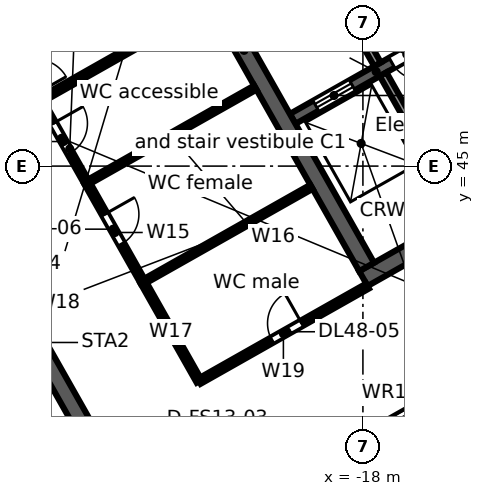
"""IFC4 building model, lengths in metres.
Left out: names, types, materials, properties, quantities, classifications, styles, units other than length and angle.
Written with IfcOpenShell. Run it as: python <this file> out.ifc"""

import sys

from ifc_helpers import new_model, si_unit, direction, frame, frame_2d, origin, place, context, subcontext, project, spatial, rectangle, extrude, element, fill, save


model = new_model("IFC4")
c1 = context("Model", 3, precision=1e-05, world=origin(), true_north=direction((0.0, 1.0)))
c2 = subcontext(c1, "Body", "Model", "MODEL_VIEW")
j1 = project(units=[si_unit("LENGTHUNIT", "METRE"), si_unit("PLANEANGLEUNIT", "RADIAN")], contexts=[c1])
p1 = place(None, origin())
s1 = spatial("IfcSite", under=j1, at=p1, CompositionType="ELEMENT")
p2 = place(p1, origin())
s2 = spatial("IfcBuilding", under=s1, at=p2, CompositionType="ELEMENT")
p3 = place(p2, frame((0.0, 0.0, 219.2)))
s3 = spatial("IfcBuildingStorey", under=s2, at=p3, CompositionType="ELEMENT", Elevation=219.2)
p4 = place(p3, frame((-0.046, 47.974, 0.0), z_axis=(0.0, 0.0, 1.0), x_axis=(-0.870356579543, -0.492421998337, 0.0)))
e1 = element("IfcWall", 1, at=p4, inside=s3, PredefinedType="STANDARD", context=c2, shape_type="SweptSolid", body=[
    extrude(rectangle(XDim=43.754, YDim=0.25, at=frame_2d((21.877, 0.0))), origin(), (0.0, 0.0, 1.0), 3.62),
])
p5 = place(p4, frame((41.061, 0.0, 0.8)))
e2 = element("IfcOpeningElement", 2, at=p5, cuts=e1, PredefinedType="OPENING", context=c2, shape_type="SweptSolid", body=[
    extrude(rectangle(XDim=2.4, YDim=2.2, at=frame_2d((1.2, 1.1))), frame((0.0, 0.135, 0.0), z_axis=(0.0, -1.0, 0.0), x_axis=(1.0, 0.0, 0.0)), (0.0, 0.0, 1.0), 0.27),
])
p6 = place(p4, frame((38.443, 0.0, 0.0)))
e3 = element("IfcOpeningElement", 3, at=p6, cuts=e1, PredefinedType="OPENING", context=c2, shape_type="SweptSolid", body=[
    extrude(rectangle(XDim=1.8, YDim=2.4, at=frame_2d((0.9, 1.2))), frame((0.0, 0.135, 0.0), z_axis=(0.0, -1.0, 0.0), x_axis=(1.0, 0.0, 0.0)), (0.0, 0.0, 1.0), 0.27),
])
p7 = place(p4, frame((35.225, 0.0, 0.8)))
e4 = element("IfcOpeningElement", 4, at=p7, cuts=e1, PredefinedType="OPENING", context=c2, shape_type="SweptSolid", body=[
    extrude(rectangle(XDim=2.4, YDim=2.2, at=frame_2d((1.2, 1.1))), frame((0.0, 0.135, 0.0), z_axis=(0.0, -1.0, 0.0), x_axis=(1.0, 0.0, 0.0)), (0.0, 0.0, 1.0), 0.27),
])
p8 = place(p4, frame((32.307, 0.0, 0.8)))
e5 = element("IfcOpeningElement", 5, at=p8, cuts=e1, PredefinedType="OPENING", context=c2, shape_type="SweptSolid", body=[
    extrude(rectangle(XDim=2.4, YDim=2.2, at=frame_2d((1.2, 1.1))), frame((0.0, 0.135, 0.0), z_axis=(0.0, -1.0, 0.0), x_axis=(1.0, 0.0, 0.0)), (0.0, 0.0, 1.0), 0.27),
])
p9 = place(p4, frame((29.688, 0.0, 0.0)))
e6 = element("IfcOpeningElement", 6, at=p9, cuts=e1, PredefinedType="OPENING", context=c2, shape_type="SweptSolid", body=[
    extrude(rectangle(XDim=1.8, YDim=2.4, at=frame_2d((0.9, 1.2))), frame((0.0, 0.135, 0.0), z_axis=(0.0, -1.0, 0.0), x_axis=(1.0, 0.0, 0.0)), (0.0, 0.0, 1.0), 0.27),
])
p10 = place(p4, frame((26.47, 0.0, 0.8)))
e7 = element("IfcOpeningElement", 7, at=p10, cuts=e1, PredefinedType="OPENING", context=c2, shape_type="SweptSolid", body=[
    extrude(rectangle(XDim=2.4, YDim=2.2, at=frame_2d((1.2, 1.1))), frame((0.0, 0.135, 0.0), z_axis=(0.0, -1.0, 0.0), x_axis=(1.0, 0.0, 0.0)), (0.0, 0.0, 1.0), 0.27),
])
p11 = place(p4, frame((23.552, 0.0, 0.8)))
e8 = element("IfcOpeningElement", 8, at=p11, cuts=e1, PredefinedType="OPENING", context=c2, shape_type="SweptSolid", body=[
    extrude(rectangle(XDim=2.4, YDim=2.2, at=frame_2d((1.2, 1.1))), frame((0.0, 0.135, 0.0), z_axis=(0.0, -1.0, 0.0), x_axis=(1.0, 0.0, 0.0)), (0.0, 0.0, 1.0), 0.27),
])
p12 = place(p4, frame((20.934, 0.0, 0.0)))
e9 = element("IfcOpeningElement", 9, at=p12, cuts=e1, PredefinedType="OPENING", context=c2, shape_type="SweptSolid", body=[
    extrude(rectangle(XDim=1.8, YDim=2.4, at=frame_2d((0.9, 1.2))), frame((0.0, 0.135, 0.0), z_axis=(0.0, -1.0, 0.0), x_axis=(1.0, 0.0, 0.0)), (0.0, 0.0, 1.0), 0.27),
])
p13 = place(p4, frame((17.716, 0.0, 0.8)))
e10 = element("IfcOpeningElement", 10, at=p13, cuts=e1, PredefinedType="OPENING", context=c2, shape_type="SweptSolid", body=[
    extrude(rectangle(XDim=2.4, YDim=2.2, at=frame_2d((1.2, 1.1))), frame((0.0, 0.135, 0.0), z_axis=(0.0, -1.0, 0.0), x_axis=(1.0, 0.0, 0.0)), (0.0, 0.0, 1.0), 0.27),
])
p14 = place(p4, frame((14.798, 0.0, 0.8)))
e11 = element("IfcOpeningElement", 11, at=p14, cuts=e1, PredefinedType="OPENING", context=c2, shape_type="SweptSolid", body=[
    extrude(rectangle(XDim=2.4, YDim=2.2, at=frame_2d((1.2, 1.1))), frame((0.0, 0.135, 0.0), z_axis=(0.0, -1.0, 0.0), x_axis=(1.0, 0.0, 0.0)), (0.0, 0.0, 1.0), 0.27),
])
p15 = place(p4, frame((12.179, 0.0, 0.0)))
e12 = element("IfcOpeningElement", 12, at=p15, cuts=e1, PredefinedType="OPENING", context=c2, shape_type="SweptSolid", body=[
    extrude(rectangle(XDim=1.8, YDim=2.4, at=frame_2d((0.9, 1.2))), frame((0.0, 0.135, 0.0), z_axis=(0.0, -1.0, 0.0), x_axis=(1.0, 0.0, 0.0)), (0.0, 0.0, 1.0), 0.27),
])
p16 = place(p4, frame((8.961, 0.0, 0.8)))
e13 = element("IfcOpeningElement", 13, at=p16, cuts=e1, PredefinedType="OPENING", context=c2, shape_type="SweptSolid", body=[
    extrude(rectangle(XDim=2.4, YDim=2.2, at=frame_2d((1.2, 1.1))), frame((0.0, 0.135, 0.0), z_axis=(0.0, -1.0, 0.0), x_axis=(1.0, 0.0, 0.0)), (0.0, 0.0, 1.0), 0.27),
])
p17 = place(p4, frame((6.043, 0.0, 0.8)))
e14 = element("IfcOpeningElement", 14, at=p17, cuts=e1, PredefinedType="OPENING", context=c2, shape_type="SweptSolid", body=[
    extrude(rectangle(XDim=2.4, YDim=2.2, at=frame_2d((1.2, 1.1))), frame((0.0, 0.135, 0.0), z_axis=(0.0, -1.0, 0.0), x_axis=(1.0, 0.0, 0.0)), (0.0, 0.0, 1.0), 0.27),
])
p18 = place(p4, frame((3.425, 0.0, 0.0)))
e15 = element("IfcOpeningElement", 15, at=p18, cuts=e1, PredefinedType="OPENING", context=c2, shape_type="SweptSolid", body=[
    extrude(rectangle(XDim=1.8, YDim=2.4, at=frame_2d((0.9, 1.2))), frame((0.0, 0.135, 0.0), z_axis=(0.0, -1.0, 0.0), x_axis=(1.0, 0.0, 0.0)), (0.0, 0.0, 1.0), 0.27),
])
p19 = place(p4, frame((0.207, 0.0, 0.8)))
e16 = element("IfcOpeningElement", 16, at=p19, cuts=e1, PredefinedType="OPENING", context=c2, shape_type="SweptSolid", body=[
    extrude(rectangle(XDim=2.4, YDim=2.2, at=frame_2d((1.2, 1.1))), frame((0.0, 0.135, 0.0), z_axis=(0.0, -1.0, 0.0), x_axis=(1.0, 0.0, 0.0)), (0.0, 0.0, 1.0), 0.27),
])
p20 = place(p3, frame((-58.732, 38.771, 0.0), z_axis=(0.0, 0.0, 1.0), x_axis=(0.870354824205, 0.492425100887, 0.0)))
e17 = element("IfcWall", 17, at=p20, inside=s3, PredefinedType="STANDARD", context=c2, shape_type="SweptSolid", body=[
    extrude(rectangle(XDim=64.006, YDim=0.25, at=frame_2d((32.003, 0.0))), origin(), (0.0, 0.0, 1.0), 3.62),
])
p21 = place(p20, frame((61.259, 0.0, 0.8)))
e18 = element("IfcOpeningElement", 18, at=p21, cuts=e17, PredefinedType="OPENING", context=c2, shape_type="SweptSolid", body=[
    extrude(rectangle(XDim=2.4, YDim=2.2, at=frame_2d((1.2, 1.1))), frame((0.0, 0.135, 0.0), z_axis=(0.0, -1.0, 0.0), x_axis=(1.0, 0.0, 0.0)), (0.0, 0.0, 1.0), 0.27),
])
p22 = place(p20, frame((58.216, 0.0, 0.8)))
e19 = element("IfcOpeningElement", 19, at=p22, cuts=e17, PredefinedType="OPENING", context=c2, shape_type="SweptSolid", body=[
    extrude(rectangle(XDim=2.4, YDim=2.2, at=frame_2d((1.2, 1.1))), frame((0.0, 0.135, 0.0), z_axis=(0.0, -1.0, 0.0), x_axis=(1.0, 0.0, 0.0)), (0.0, 0.0, 1.0), 0.27),
])
p23 = place(p20, frame((55.173, 0.0, 0.8)))
e20 = element("IfcOpeningElement", 20, at=p23, cuts=e17, PredefinedType="OPENING", context=c2, shape_type="SweptSolid", body=[
    extrude(rectangle(XDim=2.4, YDim=2.2, at=frame_2d((1.2, 1.1))), frame((0.0, 0.135, 0.0), z_axis=(0.0, -1.0, 0.0), x_axis=(1.0, 0.0, 0.0)), (0.0, 0.0, 1.0), 0.27),
])
p24 = place(p20, frame((52.129, 0.0, 0.8)))
e21 = element("IfcOpeningElement", 21, at=p24, cuts=e17, PredefinedType="OPENING", context=c2, shape_type="SweptSolid", body=[
    extrude(rectangle(XDim=2.4, YDim=2.2, at=frame_2d((1.2, 1.1))), frame((0.0, 0.135, 0.0), z_axis=(0.0, -1.0, 0.0), x_axis=(1.0, 0.0, 0.0)), (0.0, 0.0, 1.0), 0.27),
])
p25 = place(p20, frame((49.086, 0.0, 0.8)))
e22 = element("IfcOpeningElement", 22, at=p25, cuts=e17, PredefinedType="OPENING", context=c2, shape_type="SweptSolid", body=[
    extrude(rectangle(XDim=2.4, YDim=2.2, at=frame_2d((1.2, 1.1))), frame((0.0, 0.135, 0.0), z_axis=(0.0, -1.0, 0.0), x_axis=(1.0, 0.0, 0.0)), (0.0, 0.0, 1.0), 0.27),
])
p26 = place(p20, frame((46.043, 0.0, 0.8)))
e23 = element("IfcOpeningElement", 23, at=p26, cuts=e17, PredefinedType="OPENING", context=c2, shape_type="SweptSolid", body=[
    extrude(rectangle(XDim=2.4, YDim=2.2, at=frame_2d((1.2, 1.1))), frame((0.0, 0.135, 0.0), z_axis=(0.0, -1.0, 0.0), x_axis=(1.0, 0.0, 0.0)), (0.0, 0.0, 1.0), 0.27),
])
p27 = place(p20, frame((43.0, 0.0, 0.8)))
e24 = element("IfcOpeningElement", 24, at=p27, cuts=e17, PredefinedType="OPENING", context=c2, shape_type="SweptSolid", body=[
    extrude(rectangle(XDim=2.4, YDim=2.2, at=frame_2d((1.2, 1.1))), frame((0.0, 0.135, 0.0), z_axis=(0.0, -1.0, 0.0), x_axis=(1.0, 0.0, 0.0)), (0.0, 0.0, 1.0), 0.27),
])
p28 = place(p20, frame((39.956, 0.0, 0.8)))
e25 = element("IfcOpeningElement", 25, at=p28, cuts=e17, PredefinedType="OPENING", context=c2, shape_type="SweptSolid", body=[
    extrude(rectangle(XDim=2.4, YDim=2.2, at=frame_2d((1.2, 1.1))), frame((0.0, 0.135, 0.0), z_axis=(0.0, -1.0, 0.0), x_axis=(1.0, 0.0, 0.0)), (0.0, 0.0, 1.0), 0.27),
])
p29 = place(p20, frame((36.913, 0.0, 0.8)))
e26 = element("IfcOpeningElement", 26, at=p29, cuts=e17, PredefinedType="OPENING", context=c2, shape_type="SweptSolid", body=[
    extrude(rectangle(XDim=2.4, YDim=2.2, at=frame_2d((1.2, 1.1))), frame((0.0, 0.135, 0.0), z_axis=(0.0, -1.0, 0.0), x_axis=(1.0, 0.0, 0.0)), (0.0, 0.0, 1.0), 0.27),
])
p30 = place(p20, frame((33.87, 0.0, 0.8)))
e27 = element("IfcOpeningElement", 27, at=p30, cuts=e17, PredefinedType="OPENING", context=c2, shape_type="SweptSolid", body=[
    extrude(rectangle(XDim=2.4, YDim=2.2, at=frame_2d((1.2, 1.1))), frame((0.0, 0.135, 0.0), z_axis=(0.0, -1.0, 0.0), x_axis=(1.0, 0.0, 0.0)), (0.0, 0.0, 1.0), 0.27),
])
p31 = place(p20, frame((30.826, 0.0, 0.8)))
e28 = element("IfcOpeningElement", 28, at=p31, cuts=e17, PredefinedType="OPENING", context=c2, shape_type="SweptSolid", body=[
    extrude(rectangle(XDim=2.4, YDim=2.2, at=frame_2d((1.2, 1.1))), frame((0.0, 0.135, 0.0), z_axis=(0.0, -1.0, 0.0), x_axis=(1.0, 0.0, 0.0)), (0.0, 0.0, 1.0), 0.27),
])
p32 = place(p20, frame((27.783, 0.0, 0.8)))
e29 = element("IfcOpeningElement", 29, at=p32, cuts=e17, PredefinedType="OPENING", context=c2, shape_type="SweptSolid", body=[
    extrude(rectangle(XDim=2.4, YDim=2.2, at=frame_2d((1.2, 1.1))), frame((0.0, 0.135, 0.0), z_axis=(0.0, -1.0, 0.0), x_axis=(1.0, 0.0, 0.0)), (0.0, 0.0, 1.0), 0.27),
])
p33 = place(p20, frame((24.74, 0.0, 0.8)))
e30 = element("IfcOpeningElement", 30, at=p33, cuts=e17, PredefinedType="OPENING", context=c2, shape_type="SweptSolid", body=[
    extrude(rectangle(XDim=2.4, YDim=2.2, at=frame_2d((1.2, 1.1))), frame((0.0, 0.135, 0.0), z_axis=(0.0, -1.0, 0.0), x_axis=(1.0, 0.0, 0.0)), (0.0, 0.0, 1.0), 0.27),
])
p34 = place(p20, frame((21.696, 0.0, 0.8)))
e31 = element("IfcOpeningElement", 31, at=p34, cuts=e17, PredefinedType="OPENING", context=c2, shape_type="SweptSolid", body=[
    extrude(rectangle(XDim=2.4, YDim=2.2, at=frame_2d((1.2, 1.1))), frame((0.0, 0.135, 0.0), z_axis=(0.0, -1.0, 0.0), x_axis=(1.0, 0.0, 0.0)), (0.0, 0.0, 1.0), 0.27),
])
p35 = place(p20, frame((18.653, 0.0, 0.8)))
e32 = element("IfcOpeningElement", 32, at=p35, cuts=e17, PredefinedType="OPENING", context=c2, shape_type="SweptSolid", body=[
    extrude(rectangle(XDim=2.4, YDim=2.2, at=frame_2d((1.2, 1.1))), frame((0.0, 0.135, 0.0), z_axis=(0.0, -1.0, 0.0), x_axis=(1.0, 0.0, 0.0)), (0.0, 0.0, 1.0), 0.27),
])
p36 = place(p20, frame((15.61, 0.0, 0.8)))
e33 = element("IfcOpeningElement", 33, at=p36, cuts=e17, PredefinedType="OPENING", context=c2, shape_type="SweptSolid", body=[
    extrude(rectangle(XDim=2.4, YDim=2.2, at=frame_2d((1.2, 1.1))), frame((0.0, 0.135, 0.0), z_axis=(0.0, -1.0, 0.0), x_axis=(1.0, 0.0, 0.0)), (0.0, 0.0, 1.0), 0.27),
])
p37 = place(p20, frame((12.567, 0.0, 0.8)))
e34 = element("IfcOpeningElement", 34, at=p37, cuts=e17, PredefinedType="OPENING", context=c2, shape_type="SweptSolid", body=[
    extrude(rectangle(XDim=2.4, YDim=2.2, at=frame_2d((1.2, 1.1))), frame((0.0, 0.135, 0.0), z_axis=(0.0, -1.0, 0.0), x_axis=(1.0, 0.0, 0.0)), (0.0, 0.0, 1.0), 0.27),
])
p38 = place(p20, frame((9.523, 0.0, 0.8)))
e35 = element("IfcOpeningElement", 35, at=p38, cuts=e17, PredefinedType="OPENING", context=c2, shape_type="SweptSolid", body=[
    extrude(rectangle(XDim=2.4, YDim=2.2, at=frame_2d((1.2, 1.1))), frame((0.0, 0.135, 0.0), z_axis=(0.0, -1.0, 0.0), x_axis=(1.0, 0.0, 0.0)), (0.0, 0.0, 1.0), 0.27),
])
p39 = place(p20, frame((6.48, 0.0, 0.8)))
e36 = element("IfcOpeningElement", 36, at=p39, cuts=e17, PredefinedType="OPENING", context=c2, shape_type="SweptSolid", body=[
    extrude(rectangle(XDim=2.4, YDim=2.2, at=frame_2d((1.2, 1.1))), frame((0.0, 0.135, 0.0), z_axis=(0.0, -1.0, 0.0), x_axis=(1.0, 0.0, 0.0)), (0.0, 0.0, 1.0), 0.27),
])
p40 = place(p20, frame((3.437, 0.0, 0.8)))
e37 = element("IfcOpeningElement", 37, at=p40, cuts=e17, PredefinedType="OPENING", context=c2, shape_type="SweptSolid", body=[
    extrude(rectangle(XDim=2.4, YDim=2.2, at=frame_2d((1.2, 1.1))), frame((0.0, 0.135, 0.0), z_axis=(0.0, -1.0, 0.0), x_axis=(1.0, 0.0, 0.0)), (0.0, 0.0, 1.0), 0.27),
])
p41 = place(p20, frame((0.393, 0.0, 0.8)))
e38 = element("IfcOpeningElement", 38, at=p41, cuts=e17, PredefinedType="OPENING", context=c2, shape_type="SweptSolid", body=[
    extrude(rectangle(XDim=2.4, YDim=2.2, at=frame_2d((1.2, 1.1))), frame((0.0, 0.135, 0.0), z_axis=(0.0, -1.0, 0.0), x_axis=(1.0, 0.0, 0.0)), (0.0, 0.0, 1.0), 0.27),
])
p42 = place(p3, frame((-31.787, 49.542, 0.0), z_axis=(0.0, 0.0, 1.0), x_axis=(0.492421378713, -0.870356930107, 0.0)))
e39 = element("IfcWall", 39, at=p42, inside=s3, PredefinedType="SOLIDWALL", context=c2, shape_type="SweptSolid", body=[
    extrude(rectangle(XDim=13.1, YDim=0.45, at=frame_2d((6.55, 0.0))), origin(), (0.0, 0.0, 1.0), 3.62),
])
p43 = place(p3, frame((-17.988, 42.039, 0.0), z_axis=(0.0, 0.0, 1.0), x_axis=(0.870360574057, 0.492414937962, 0.0)))
e40 = element("IfcWall", 40, at=p43, inside=s3, PredefinedType="SOLIDWALL", context=c2, shape_type="SweptSolid", body=[
    extrude(rectangle(XDim=15.0, YDim=0.45, at=frame_2d((7.5, 0.0))), origin(), (0.0, 0.0, 1.0), 3.62),
])
p44 = place(p43, frame((6.1, 0.0, 0.0)))
e41 = element("IfcOpeningElement", 41, at=p44, cuts=e40, PredefinedType="OPENING", context=c2, shape_type="SweptSolid", body=[
    extrude(rectangle(XDim=1.2, YDim=2.1, at=frame_2d((0.6, 1.05))), frame((0.0, 0.235, 0.0), z_axis=(0.0, -1.0, 0.0), x_axis=(1.0, 0.0, 0.0)), (0.0, 0.0, 1.0), 0.47),
])
p45 = place(p3, frame((-19.849, 46.242, 0.0), z_axis=(0.0, 0.0, 1.0), x_axis=(0.870347559728, 0.492437940532, 0.0)))
e42 = element("IfcWall", 42, at=p45, inside=s3, PredefinedType="SOLIDWALL", context=c2, shape_type="SweptSolid", body=[
    extrude(rectangle(XDim=5.05, YDim=0.3, at=frame_2d((2.525, 0.0))), origin(), (0.0, 0.0, 1.0), 3.62),
])
p46 = place(p45, frame((0.7, 0.0, 0.0)))
e43 = element("IfcOpeningElement", 43, at=p46, cuts=e42, PredefinedType="OPENING", context=c2, shape_type="SweptSolid", body=[
    extrude(rectangle(XDim=1.1, YDim=2.1, at=frame_2d((0.55, 1.05))), frame((0.0, 0.16, 0.0), z_axis=(0.0, -1.0, 0.0), x_axis=(1.0, 0.0, 0.0)), (0.0, 0.0, 1.0), 0.32),
])
p47 = place(p45, frame((3.0, 0.0, 0.0)))
e44 = element("IfcOpeningElement", 44, at=p47, cuts=e42, PredefinedType="OPENING", context=c2, shape_type="SweptSolid", body=[
    extrude(rectangle(XDim=0.9, YDim=2.1, at=frame_2d((0.45, 1.05))), frame((0.0, 0.16, 0.0), z_axis=(0.0, -1.0, 0.0), x_axis=(1.0, 0.0, 0.0)), (0.0, 0.0, 1.0), 0.32),
])
p48 = place(p3, frame((-24.353, 53.747, 0.0), z_axis=(0.0, 0.0, 1.0), x_axis=(0.492435496286, -0.870348942665, 0.0)))
e45 = element("IfcWall", 45, at=p48, inside=s3, PredefinedType="SOLIDWALL", context=c2, shape_type="SweptSolid", body=[
    extrude(rectangle(XDim=13.1, YDim=0.45, at=frame_2d((6.55, 0.0))), origin(), (0.0, 0.0, 1.0), 3.62),
])
p49 = place(p3, frame((-17.469, 47.417, 0.0), z_axis=(0.0, 0.0, 1.0), x_axis=(0.492453686477, -0.870338650569, 0.0)))
e46 = element("IfcWall", 46, at=p49, inside=s3, PredefinedType="SOLIDWALL", context=c2, shape_type="SweptSolid", body=[
    extrude(rectangle(XDim=4.2, YDim=0.2, at=frame_2d((2.1, 0.0))), origin(), (0.0, 0.0, 1.0), 3.62),
])
p50 = place(p3, frame((-19.635, 51.246, 0.0), z_axis=(0.0, 0.0, 1.0), x_axis=(0.492408451753, -0.87036424366, 0.0)))
e47 = element("IfcWall", 47, at=p50, inside=s3, PredefinedType="PARTITIONING", context=c2, shape_type="SweptSolid", body=[
    extrude(rectangle(XDim=4.1, YDim=0.2, at=frame_2d((2.05, 0.0))), origin(), (0.0, 0.0, 1.0), 3.62),
])
p51 = place(p50, frame((1.55, 0.0, 0.0)))
e48 = element("IfcOpeningElement", 48, at=p51, cuts=e47, PredefinedType="OPENING", context=c2, shape_type="SweptSolid", body=[
    extrude(rectangle(XDim=1.0, YDim=2.1, at=frame_2d((0.5, 1.05))), frame((0.0, 0.11, 0.0), z_axis=(0.0, -1.0, 0.0), x_axis=(1.0, 0.0, 0.0)), (0.0, 0.0, 1.0), 0.22),
])
p52 = place(p3, frame((-27.232, 48.04, 0.0), z_axis=(0.0, 0.0, 1.0), x_axis=(0.870339461844, 0.492452252668, 0.0)))
e49 = element("IfcWall", 49, at=p52, inside=s3, PredefinedType="PARTITIONING", context=c2, shape_type="SweptSolid", body=[
    extrude(rectangle(XDim=5.091, YDim=0.125, at=frame_2d((2.545, 0.0))), origin(), (0.0, 0.0, 1.0), 2.892),
])
p53 = place(p3, frame((-26.493, 46.734, 0.0), z_axis=(0.0, 0.0, 1.0), x_axis=(0.49257867544, -0.870267917656, 0.0)))
e50 = element("IfcWall", 50, at=p53, inside=s3, PredefinedType="PARTITIONING", context=c2, shape_type="SweptSolid", body=[
    extrude(rectangle(XDim=2.499, YDim=0.15, at=frame_2d((1.25, 0.0))), origin(), (0.0, 0.0, 1.0), 2.892),
])
p54 = place(p53, frame((0.7, 0.0, 0.0)))
e51 = element("IfcOpeningElement", 51, at=p54, cuts=e50, PredefinedType="OPENING", context=c2, shape_type="SweptSolid", body=[
    extrude(rectangle(XDim=0.9, YDim=2.1, at=frame_2d((0.45, 1.05))), frame((0.0, 0.085, 0.0), z_axis=(0.0, -1.0, 0.0), x_axis=(1.0, 0.0, 0.0)), (0.0, 0.0, 1.0), 0.17),
])
p55 = place(p3, frame((-26.493, 46.734, 0.0), z_axis=(0.0, 0.0, 1.0), x_axis=(0.870339461844, 0.492452252668, 0.0)))
e52 = element("IfcWall", 52, at=p55, inside=s3, PredefinedType="PARTITIONING", context=c2, shape_type="SweptSolid", body=[
    extrude(rectangle(XDim=5.091, YDim=0.15, at=frame_2d((2.545, 0.0))), origin(), (0.0, 0.0, 1.0), 2.892),
])
p56 = place(p3, frame((-25.262, 44.559, 0.0), z_axis=(0.0, 0.0, 1.0), x_axis=(0.492226144536, -0.870467358742, 0.0)))
e53 = element("IfcWall", 53, at=p56, inside=s3, PredefinedType="PARTITIONING", context=c2, shape_type="SweptSolid", body=[
    extrude(rectangle(XDim=3.001, YDim=0.15, at=frame_2d((1.5, 0.0))), origin(), (0.0, 0.0, 1.0), 3.62),
])
p57 = place(p56, frame((0.95, 0.0, 0.0)))
e54 = element("IfcOpeningElement", 54, at=p57, cuts=e53, PredefinedType="OPENING", context=c2, shape_type="SweptSolid", body=[
    extrude(rectangle(XDim=0.9, YDim=2.1, at=frame_2d((0.45, 1.05))), frame((0.0, 0.085, 0.0), z_axis=(0.0, -1.0, 0.0), x_axis=(1.0, 0.0, 0.0)), (0.0, 0.0, 1.0), 0.17),
])
p58 = place(p3, frame((-25.262, 44.559, 0.0), z_axis=(0.0, 0.0, 1.0), x_axis=(0.870442223229, 0.492270592276, 0.0)))
e55 = element("IfcWall", 55, at=p58, inside=s3, PredefinedType="PARTITIONING", context=c2, shape_type="SweptSolid", body=[
    extrude(rectangle(XDim=5.09, YDim=0.125, at=frame_2d((2.545, 0.0))), origin(), (0.0, 0.0, 1.0), 3.62),
])
p59 = place(p3, frame((-23.785, 41.947, 0.0), z_axis=(0.0, 0.0, 1.0), x_axis=(0.492303960105, -0.870423351516, 0.0)))
e56 = element("IfcWall", 56, at=p59, inside=s3, PredefinedType="PARTITIONING", context=c2, shape_type="SweptSolid", body=[
    extrude(rectangle(XDim=3.0, YDim=0.15, at=frame_2d((1.5, 0.0))), origin(), (0.0, 0.0, 1.0), 3.62),
])
p60 = place(p3, frame((-23.785, 41.947, 0.0), z_axis=(0.0, 0.0, 1.0), x_axis=(0.870339461844, 0.492452252668, 0.0)))
e57 = element("IfcWall", 57, at=p60, inside=s3, PredefinedType="PARTITIONING", context=c2, shape_type="SweptSolid", body=[
    extrude(rectangle(XDim=5.091, YDim=0.125, at=frame_2d((2.545, 0.0))), origin(), (0.0, 0.0, 1.0), 3.62),
])
p61 = place(p3, frame((-22.308, 39.336, 0.0), z_axis=(0.0, 0.0, 1.0), x_axis=(0.870351090701, 0.492431699747, 0.0)))
e58 = element("IfcWall", 58, at=p61, inside=s3, PredefinedType="PARTITIONING", context=c2, shape_type="SweptSolid", body=[
    extrude(rectangle(XDim=5.091, YDim=0.15, at=frame_2d((2.546, 0.0))), origin(), (0.0, 0.0, 1.0), 3.62),
])
p62 = place(p61, frame((2.2, 0.0, 0.0)))
e59 = element("IfcOpeningElement", 59, at=p62, cuts=e58, PredefinedType="OPENING", context=c2, shape_type="SweptSolid", body=[
    extrude(rectangle(XDim=0.9, YDim=2.1, at=frame_2d((0.45, 1.05))), frame((0.0, 0.085, 0.0), z_axis=(0.0, -1.0, 0.0), x_axis=(1.0, 0.0, 0.0)), (0.0, 0.0, 1.0), 0.17),
])
p63 = place(p13, origin())
e60 = element("IfcWindow", 60, at=p63, inside=s3, PartitioningType="SINGLE_PANEL", PredefinedType="WINDOW", context=c2, shape_type="SweptSolid", body=[
    extrude(rectangle(XDim=2.4, YDim=2.2, at=frame_2d((1.2, 1.1))), frame((0.0, 0.03, 0.0), z_axis=(0.0, -1.0, 0.0), x_axis=(1.0, 0.0, 0.0)), (0.0, 0.0, 1.0), 0.06),
])
fill(e10, e60)
p64 = place(p46, origin())
e61 = element("IfcDoor", 61, at=p64, inside=s3, OperationType="DOUBLE_DOOR_SLIDING", PredefinedType="DOOR", context=c2, shape_type="SweptSolid", body=[
    extrude(rectangle(XDim=1.1, YDim=2.1, at=frame_2d((0.55, 1.05))), frame((0.0, 0.025, 0.0), z_axis=(0.0, -1.0, 0.0), x_axis=(1.0, 0.0, 0.0)), (0.0, 0.0, 1.0), 0.05),
])
fill(e43, e61)
p65 = place(p47, frame((0.9, 0.0, 0.0), z_axis=(0.0, 0.0, 1.0), x_axis=(-1.0, 0.0, 0.0)))
e62 = element("IfcDoor", 62, at=p65, inside=s3, OperationType="SINGLE_SWING_LEFT", PredefinedType="DOOR", context=c2, shape_type="SweptSolid", body=[
    extrude(rectangle(XDim=0.9, YDim=2.1, at=frame_2d((0.45, 1.05))), frame((0.0, 0.025, 0.0), z_axis=(0.0, -1.0, 0.0), x_axis=(1.0, 0.0, 0.0)), (0.0, 0.0, 1.0), 0.05),
])
fill(e44, e62)
p66 = place(p62, origin())
e63 = element("IfcDoor", 63, at=p66, inside=s3, OperationType="SINGLE_SWING_RIGHT", PredefinedType="DOOR", context=c2, shape_type="SweptSolid", body=[
    extrude(rectangle(XDim=0.9, YDim=2.1, at=frame_2d((0.45, 1.05))), frame((0.0, 0.025, 0.0), z_axis=(0.0, -1.0, 0.0), x_axis=(1.0, 0.0, 0.0)), (0.0, 0.0, 1.0), 0.05),
])
fill(e59, e63)
p67 = place(p57, origin())
e64 = element("IfcDoor", 64, at=p67, inside=s3, OperationType="SINGLE_SWING_LEFT", PredefinedType="DOOR", context=c2, shape_type="SweptSolid", body=[
    extrude(rectangle(XDim=0.9, YDim=2.1, at=frame_2d((0.45, 1.05))), frame((0.0, 0.025, 0.0), z_axis=(0.0, -1.0, 0.0), x_axis=(1.0, 0.0, 0.0)), (0.0, 0.0, 1.0), 0.05),
])
fill(e54, e64)
p68 = place(p54, origin())
e65 = element("IfcDoor", 65, at=p68, inside=s3, OperationType="SINGLE_SWING_LEFT", PredefinedType="DOOR", context=c2, shape_type="SweptSolid", body=[
    extrude(rectangle(XDim=0.9, YDim=2.1, at=frame_2d((0.45, 1.05))), frame((0.0, 0.025, 0.0), z_axis=(0.0, -1.0, 0.0), x_axis=(1.0, 0.0, 0.0)), (0.0, 0.0, 1.0), 0.05),
])
fill(e51, e65)
save(model, sys.argv[1])
